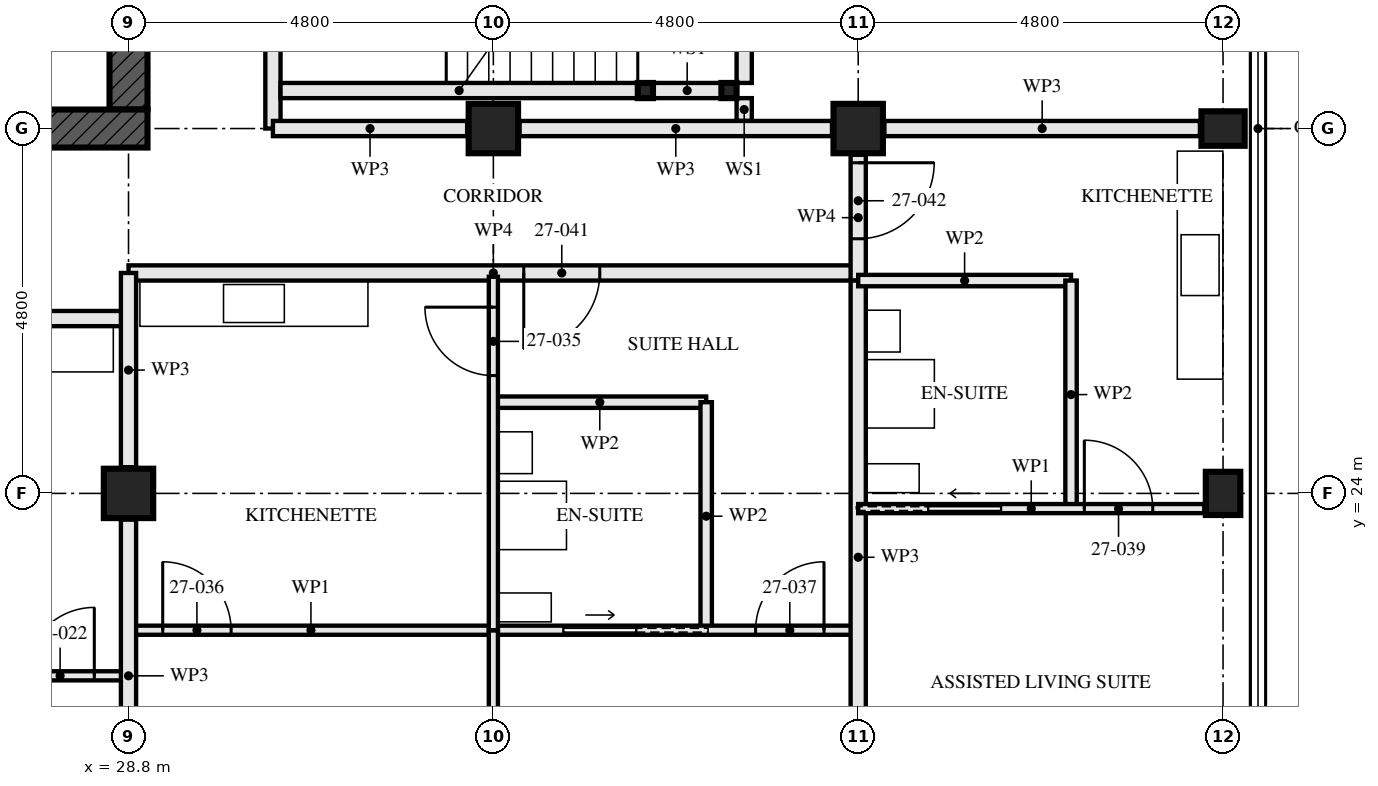
"""IFC4 building model, lengths in metres.
Left out: names, types, materials, properties, quantities, classifications, styles, units other than length and angle.
Written with IfcOpenShell. Run it as: python <this file> out.ifc"""

import sys

from ifc_helpers import new_model, si_unit, direction, frame, frame_2d, origin, origin_2d, place, context, subcontext, project, spatial, rectangle, hollow_rectangle, i_section, extrude, element, fill, save


model = new_model("IFC4")
c1 = context("Model", 3, precision=1e-05, world=origin(), true_north=direction((0.0, 1.0)))
c2 = subcontext(c1, "Body", "Model", "MODEL_VIEW")
j1 = project(units=[si_unit("LENGTHUNIT", "METRE"), si_unit("PLANEANGLEUNIT", "RADIAN")], contexts=[c1])
p1 = place(None, origin())
s1 = spatial("IfcSite", under=j1, at=p1, CompositionType="ELEMENT")
p2 = place(p1, origin())
s2 = spatial("IfcBuilding", under=s1, at=p2, CompositionType="ELEMENT")
p3 = place(p2, frame((0.0, 0.0, 101.5)))
s3 = spatial("IfcBuildingStorey", under=s2, at=p3, CompositionType="ELEMENT", Elevation=101.5)
for number, where, z_axis, x_axis in (
    (1, (28.8, 24.0, 0.0), (0.0, 0.0, 1.0), (1.0, 0.0, 0.0)),
    (2, (33.6, 28.8, 0.0), (0.0, 0.0, 1.0), (0.0, 1.0, 0.0)),
    (3, (38.4, 28.8, 0.0), (0.0, 0.0, 1.0), (0.0, 1.0, 0.0)),
):
    element("IfcColumn", number, at=place(p3, frame(where, z_axis=z_axis, x_axis=x_axis)), inside=s3, PredefinedType="COLUMN", context=c2, shape_type="SweptSolid", body=[
        extrude(hollow_rectangle(XDim=0.65, YDim=0.65, WallThickness=0.05, at=origin_2d()), origin(), (0.0, 0.0, 1.0), 3.5),
    ])
for number, where, z_axis, x_axis in (
    (4, (43.2, 24.0, 0.0), (0.0, 0.0, 1.0), (1.0, 0.0, 0.0)),
    (5, (43.2, 28.8, 0.0), (0.0, 0.0, 1.0), (0.0, 1.0, 0.0)),
):
    element("IfcColumn", number, at=place(p3, frame(where, z_axis=z_axis, x_axis=x_axis)), inside=s3, PredefinedType="COLUMN", context=c2, shape_type="SweptSolid", body=[
        extrude(i_section(OverallWidth=0.454, OverallDepth=0.569, WebThickness=0.078, FlangeThickness=0.125, FilletRadius=0.015, at=origin_2d()), origin(), (0.0, 0.0, 1.0), 3.5),
    ])
p4 = place(p3, frame((14.15, 28.8, -0.17), z_axis=(0.0, 0.0, 1.0), x_axis=(1.0, 0.0, 0.0)))
e6 = element("IfcWall", 6, at=p4, inside=s3, PredefinedType="SHEAR", context=c2, shape_type="SweptSolid", body=[
    extrude(rectangle(XDim=14.9, YDim=0.5, at=frame_2d((7.45, 0.0))), origin(), (0.0, 0.0, 1.0), 3.5),
])
p5 = place(p4, frame((6.85, 0.0, 0.17)))
e7 = element("IfcOpeningElement", 7, at=p5, cuts=e6, PredefinedType="OPENING", context=c2, shape_type="SweptSolid", body=[
    extrude(rectangle(XDim=1.2, YDim=2.1, at=frame_2d((0.6, 1.05))), frame((0.0, 0.26, 0.0), z_axis=(0.0, -1.0, 0.0), x_axis=(1.0, 0.0, 0.0)), (0.0, 0.0, 1.0), 0.521),
])
p6 = place(p3, frame((28.8, 29.05, -0.17), z_axis=(0.0, 0.0, 1.0), x_axis=(0.0, 1.0, 0.0)))
e8 = element("IfcWall", 8, at=p6, inside=s3, PredefinedType="SHEAR", context=c2, shape_type="SweptSolid", body=[
    extrude(rectangle(XDim=13.9, YDim=0.5, at=frame_2d((6.95, 0.0))), origin(), (0.0, 0.0, 1.0), 3.5),
])
p7 = place(p6, frame((6.35, 0.0, 0.17)))
e9 = element("IfcOpeningElement", 9, at=p7, cuts=e8, PredefinedType="OPENING", context=c2, shape_type="SweptSolid", body=[
    extrude(rectangle(XDim=1.2, YDim=2.1, at=frame_2d((0.6, 1.05))), frame((0.0, 0.26, 0.0), z_axis=(0.0, -1.0, 0.0), x_axis=(1.0, 0.0, 0.0)), (0.0, 0.0, 1.0), 0.521),
])
for number, where, z_axis, x_axis in (
    (10, (36.7, 29.3, 0.0), (0.0, 0.0, 1.0), (1.0, 0.0, 0.0)),
    (11, (35.6, 29.3, 0.0), (0.0, 0.0, 1.0), (1.0, 0.0, 0.0)),
):
    element("IfcColumn", number, at=place(p3, frame(where, z_axis=z_axis, x_axis=x_axis)), inside=s3, PredefinedType="COLUMN", context=c2, shape_type="SweptSolid", body=[
        extrude(hollow_rectangle(XDim=0.2, YDim=0.2, WallThickness=0.008, at=origin_2d()), origin(), (0.0, 0.0, 1.0), 3.33),
    ])
p8 = place(p3, frame((24.0, 21.6, 0.0), z_axis=(0.0, 0.0, 1.0), x_axis=(1.0, 0.0, 0.0)))
e12 = element("IfcWall", 12, at=p8, inside=s3, PredefinedType="PARTITIONING", context=c2, shape_type="SweptSolid", body=[
    extrude(rectangle(XDim=4.8, YDim=0.12, at=frame_2d((2.4, 0.0))), origin(), (0.0, 0.0, 1.0), 3.33),
])
p9 = place(p8, frame((3.45, 0.0, 0.0)))
e13 = element("IfcOpeningElement", 13, at=p9, cuts=e12, PredefinedType="OPENING", context=c2, shape_type="SweptSolid", body=[
    extrude(rectangle(XDim=0.9, YDim=2.1, at=frame_2d((0.45, 1.05))), frame((0.0, 0.071, 0.0), z_axis=(0.0, -1.0, 0.0), x_axis=(1.0, 0.0, 0.0)), (0.0, 0.0, 1.0), 0.141),
])
p10 = place(p8, frame((0.925, 0.0, 0.0)))
e14 = element("IfcOpeningElement", 14, at=p10, cuts=e12, PredefinedType="OPENING", context=c2, shape_type="SweptSolid", body=[
    extrude(rectangle(XDim=0.95, YDim=2.1, at=frame_2d((0.475, 1.05))), frame((0.0, 0.071, 0.0), z_axis=(0.0, -1.0, 0.0), x_axis=(1.0, 0.0, 0.0)), (0.0, 0.0, 1.0), 0.141),
])
p11 = place(p3, frame((17.8, 26.3, 0.0), z_axis=(0.0, 0.0, 1.0), x_axis=(1.0, 0.0, 0.0)))
e15 = element("IfcWall", 15, at=p11, inside=s3, PredefinedType="PARTITIONING", context=c2, shape_type="SweptSolid", body=[
    extrude(rectangle(XDim=11.0, YDim=0.2, at=frame_2d((5.5, 0.0))), origin(), (0.0, 0.0, 1.0), 2.55),
])
p12 = place(p11, frame((0.06, 0.0, 0.0)))
e16 = element("IfcOpeningElement", 16, at=p12, cuts=e15, PredefinedType="OPENING", context=c2, shape_type="SweptSolid", body=[
    extrude(rectangle(XDim=1.0, YDim=2.1, at=frame_2d((0.5, 1.05))), frame((0.0, 0.111, 0.0), z_axis=(0.0, -1.0, 0.0), x_axis=(1.0, 0.0, 0.0)), (0.0, 0.0, 1.0), 0.221),
])
p13 = place(p11, frame((6.6, 0.0, 0.0)))
e17 = element("IfcOpeningElement", 17, at=p13, cuts=e15, PredefinedType="OPENING", context=c2, shape_type="SweptSolid", body=[
    extrude(rectangle(XDim=1.0, YDim=2.1, at=frame_2d((0.5, 1.05))), frame((0.0, 0.111, 0.0), z_axis=(0.0, -1.0, 0.0), x_axis=(1.0, 0.0, 0.0)), (0.0, 0.0, 1.0), 0.221),
])
p14 = place(p3, frame((36.4, 22.2, 0.0), z_axis=(0.0, 0.0, 1.0), x_axis=(0.0, 1.0, 0.0)))
e18 = element("IfcWall", 18, at=p14, inside=s3, PredefinedType="PARTITIONING", context=c2, shape_type="SweptSolid", body=[
    extrude(rectangle(XDim=3.0, YDim=0.15, at=frame_2d((1.5, 0.0))), origin(), (0.0, 0.0, 1.0), 2.55),
])
p15 = place(p3, frame((33.6, 25.2, 0.0), z_axis=(0.0, 0.0, 1.0), x_axis=(1.0, 0.0, 0.0)))
e19 = element("IfcWall", 19, at=p15, inside=s3, PredefinedType="PARTITIONING", context=c2, shape_type="SweptSolid", body=[
    extrude(rectangle(XDim=2.8, YDim=0.15, at=frame_2d((1.4, 0.0))), origin(), (0.0, 0.0, 1.0), 3.33),
])
p16 = place(p3, frame((33.6, 22.2, 0.0), z_axis=(0.0, 0.0, 1.0), x_axis=(0.0, 1.0, 0.0)))
e20 = element("IfcWall", 20, at=p16, inside=s3, PredefinedType="PARTITIONING", context=c2, shape_type="SweptSolid", body=[
    extrude(rectangle(XDim=4.65, YDim=0.12, at=frame_2d((2.325, 0.0))), origin(), (0.0, 0.0, 1.0), 2.55),
])
p17 = place(p16, frame((3.35, 0.0, 0.0)))
e21 = element("IfcOpeningElement", 21, at=p17, cuts=e20, PredefinedType="OPENING", context=c2, shape_type="SweptSolid", body=[
    extrude(rectangle(XDim=0.9, YDim=2.1, at=frame_2d((0.45, 1.05))), frame((0.0, 0.071, 0.0), z_axis=(0.0, -1.0, 0.0), x_axis=(1.0, 0.0, 0.0)), (0.0, 0.0, 1.0), 0.141),
])
p18 = place(p3, frame((28.8, 22.2, 0.0), z_axis=(0.0, 0.0, 1.0), x_axis=(1.0, 0.0, 0.0)))
e22 = element("IfcWall", 22, at=p18, inside=s3, PredefinedType="PARTITIONING", context=c2, shape_type="SweptSolid", body=[
    extrude(rectangle(XDim=4.8, YDim=0.12, at=frame_2d((2.4, 0.0))), origin(), (0.0, 0.0, 1.0), 3.33),
])
p19 = place(p18, frame((0.45, 0.0, 0.0)))
e23 = element("IfcOpeningElement", 23, at=p19, cuts=e22, PredefinedType="OPENING", context=c2, shape_type="SweptSolid", body=[
    extrude(rectangle(XDim=0.9, YDim=2.1, at=frame_2d((0.45, 1.05))), frame((0.0, 0.071, 0.0), z_axis=(0.0, -1.0, 0.0), x_axis=(1.0, 0.0, 0.0)), (0.0, 0.0, 1.0), 0.141),
])
p20 = place(p3, frame((33.6, 22.2, 0.0), z_axis=(0.0, 0.0, 1.0), x_axis=(1.0, 0.0, 0.0)))
e24 = element("IfcWall", 24, at=p20, inside=s3, PredefinedType="PARTITIONING", context=c2, shape_type="SweptSolid", body=[
    extrude(rectangle(XDim=4.8, YDim=0.12, at=frame_2d((2.4, 0.0))), origin(), (0.0, 0.0, 1.0), 3.33),
])
p21 = place(p20, frame((3.45, 0.0, 0.0)))
e25 = element("IfcOpeningElement", 25, at=p21, cuts=e24, PredefinedType="OPENING", context=c2, shape_type="SweptSolid", body=[
    extrude(rectangle(XDim=0.9, YDim=2.1, at=frame_2d((0.45, 1.05))), frame((0.0, 0.071, 0.0), z_axis=(0.0, -1.0, 0.0), x_axis=(1.0, 0.0, 0.0)), (0.0, 0.0, 1.0), 0.141),
])
p22 = place(p20, frame((0.925, 0.0, 0.0)))
e26 = element("IfcOpeningElement", 26, at=p22, cuts=e24, PredefinedType="OPENING", context=c2, shape_type="SweptSolid", body=[
    extrude(rectangle(XDim=0.95, YDim=2.1, at=frame_2d((0.475, 1.05))), frame((0.0, 0.071, 0.0), z_axis=(0.0, -1.0, 0.0), x_axis=(1.0, 0.0, 0.0)), (0.0, 0.0, 1.0), 0.141),
])
p23 = place(p3, frame((33.6, 14.647, 0.0), z_axis=(0.0, 0.0, 1.0), x_axis=(0.0, 1.0, 0.0)))
e27 = element("IfcWall", 27, at=p23, inside=s3, PredefinedType="PARTITIONING", context=c2, shape_type="SweptSolid", body=[
    extrude(rectangle(XDim=7.553, YDim=0.12, at=frame_2d((3.776, 0.0))), origin(), (0.0, 0.0, 1.0), 2.55),
])
p24 = place(p3, frame((38.4, 19.52, 0.0), z_axis=(0.0, 0.0, 1.0), x_axis=(0.0, 1.0, 0.0)))
e28 = element("IfcWall", 28, at=p24, inside=s3, PredefinedType="PARTITIONING", context=c2, shape_type="SweptSolid", body=[
    extrude(rectangle(XDim=7.28, YDim=0.2, at=frame_2d((3.64, 0.0))), origin(), (0.0, 0.0, 1.0), 2.55),
])
p25 = place(p3, frame((41.2, 23.8, 0.0), z_axis=(0.0, 0.0, 1.0), x_axis=(0.0, 1.0, 0.0)))
e29 = element("IfcWall", 29, at=p25, inside=s3, PredefinedType="PARTITIONING", context=c2, shape_type="SweptSolid", body=[
    extrude(rectangle(XDim=3.0, YDim=0.15, at=frame_2d((1.5, 0.0))), origin(), (0.0, 0.0, 1.0), 2.55),
])
p26 = place(p3, frame((38.4, 26.8, 0.0), z_axis=(0.0, 0.0, 1.0), x_axis=(1.0, 0.0, 0.0)))
e30 = element("IfcWall", 30, at=p26, inside=s3, PredefinedType="PARTITIONING", context=c2, shape_type="SweptSolid", body=[
    extrude(rectangle(XDim=2.8, YDim=0.15, at=frame_2d((1.4, 0.0))), origin(), (0.0, 0.0, 1.0), 3.33),
])
p27 = place(p3, frame((38.4, 23.8, 0.0), z_axis=(0.0, 0.0, 1.0), x_axis=(1.0, 0.0, 0.0)))
e31 = element("IfcWall", 31, at=p27, inside=s3, PredefinedType="PARTITIONING", context=c2, shape_type="SweptSolid", body=[
    extrude(rectangle(XDim=4.553, YDim=0.12, at=frame_2d((2.276, 0.0))), origin(), (0.0, 0.0, 1.0), 3.33),
])
p28 = place(p27, frame((2.975, 0.0, 0.0)))
e32 = element("IfcOpeningElement", 32, at=p28, cuts=e31, PredefinedType="OPENING", context=c2, shape_type="SweptSolid", body=[
    extrude(rectangle(XDim=0.9, YDim=2.1, at=frame_2d((0.45, 1.05))), frame((0.0, 0.071, 0.0), z_axis=(0.0, -1.0, 0.0), x_axis=(1.0, 0.0, 0.0)), (0.0, 0.0, 1.0), 0.141),
])
p29 = place(p27, frame((0.925, 0.0, 0.0)))
e33 = element("IfcOpeningElement", 33, at=p29, cuts=e31, PredefinedType="OPENING", context=c2, shape_type="SweptSolid", body=[
    extrude(rectangle(XDim=0.95, YDim=2.1, at=frame_2d((0.475, 1.05))), frame((0.0, 0.071, 0.0), z_axis=(0.0, -1.0, 0.0), x_axis=(1.0, 0.0, 0.0)), (0.0, 0.0, 1.0), 0.141),
])
p30 = place(p3, frame((28.8, 26.9, 0.0), z_axis=(0.0, 0.0, 1.0), x_axis=(1.0, 0.0, 0.0)))
e34 = element("IfcWall", 34, at=p30, inside=s3, PredefinedType="PARTITIONING", context=c2, shape_type="SweptSolid", body=[
    extrude(rectangle(XDim=9.6, YDim=0.2, at=frame_2d((4.8, 0.0))), origin(), (0.0, 0.0, 1.0), 3.33),
])
p31 = place(p30, frame((5.2, 0.0, 0.0)))
e35 = element("IfcOpeningElement", 35, at=p31, cuts=e34, PredefinedType="OPENING", context=c2, shape_type="SweptSolid", body=[
    extrude(rectangle(XDim=1.0, YDim=2.1, at=frame_2d((0.5, 1.05))), frame((0.0, 0.111, 0.0), z_axis=(0.0, -1.0, 0.0), x_axis=(1.0, 0.0, 0.0)), (0.0, 0.0, 1.0), 0.221),
])
p32 = place(p3, frame((38.4, 26.8, 0.0), z_axis=(0.0, 0.0, 1.0), x_axis=(0.0, 1.0, 0.0)))
e36 = element("IfcWall", 36, at=p32, inside=s3, PredefinedType="PARTITIONING", context=c2, shape_type="SweptSolid", body=[
    extrude(rectangle(XDim=1.655, YDim=0.2, at=frame_2d((0.828, 0.0))), origin(), (0.0, 0.0, 1.0), 3.33),
])
p33 = place(p32, frame((0.55, 0.0, 0.0)))
e37 = element("IfcOpeningElement", 37, at=p33, cuts=e36, PredefinedType="OPENING", context=c2, shape_type="SweptSolid", body=[
    extrude(rectangle(XDim=1.0, YDim=2.1, at=frame_2d((0.5, 1.05))), frame((0.0, 0.111, 0.0), z_axis=(0.0, -1.0, 0.0), x_axis=(1.0, 0.0, 0.0)), (0.0, 0.0, 1.0), 0.221),
])
p34 = place(p3, frame((36.6, 29.3, 0.0), z_axis=(0.0, 0.0, 1.0), x_axis=(-1.0, 0.0, 0.0)))
e38 = element("IfcWall", 38, at=p34, inside=s3, PredefinedType="SOLIDWALL", context=c2, shape_type="SweptSolid", body=[
    extrude(rectangle(XDim=0.9, YDim=0.2, at=frame_2d((0.45, 0.0))), origin(), (0.0, 0.0, 1.0), 2.99),
])
p35 = place(p3, frame((35.5, 29.3, 0.0), z_axis=(0.0, 0.0, 1.0), x_axis=(-1.0, 0.0, 0.0)))
e39 = element("IfcWall", 39, at=p35, inside=s3, PredefinedType="SOLIDWALL", context=c2, shape_type="SweptSolid", body=[
    extrude(rectangle(XDim=4.7, YDim=0.2, at=frame_2d((2.35, 0.0))), origin(), (0.0, 0.0, 1.0), 2.99),
])
p36 = place(p3, frame((36.9, 28.9, 0.0), z_axis=(0.0, 0.0, 1.0), x_axis=(0.0, 1.0, 0.0)))
e40 = element("IfcWall", 40, at=p36, inside=s3, PredefinedType="SOLIDWALL", context=c2, shape_type="SweptSolid", body=[
    extrude(rectangle(XDim=0.3, YDim=0.2, at=frame_2d((0.15, 0.0))), origin(), (0.0, 0.0, 1.0), 3.33),
])
p37 = place(p3, frame((36.9, 29.4, 0.0), z_axis=(0.0, 0.0, 1.0), x_axis=(0.0, 1.0, 0.0)))
e41 = element("IfcWall", 41, at=p37, inside=s3, PredefinedType="SOLIDWALL", context=c2, shape_type="SweptSolid", body=[
    extrude(rectangle(XDim=2.6, YDim=0.2, at=frame_2d((1.3, 0.0))), origin(), (0.0, 0.0, 1.0), 3.33),
])
p38 = place(p3, frame((30.7, 28.8, 0.0), z_axis=(0.0, 0.0, 1.0), x_axis=(0.0, 1.0, 0.0)))
e42 = element("IfcWall", 42, at=p38, inside=s3, PredefinedType="PARTITIONING", context=c2, shape_type="SweptSolid", body=[
    extrude(rectangle(XDim=14.84, YDim=0.2, at=frame_2d((7.42, 0.0))), origin(), (0.0, 0.0, 1.0), 2.32),
])
p39 = place(p38, frame((1.4, 0.0, 0.0)))
e43 = element("IfcOpeningElement", 43, at=p39, cuts=e42, PredefinedType="OPENING", context=c2, shape_type="SweptSolid", body=[
    extrude(rectangle(XDim=1.0, YDim=2.1, at=frame_2d((0.5, 1.05))), frame((0.0, 0.111, 0.0), z_axis=(0.0, -1.0, 0.0), x_axis=(1.0, 0.0, 0.0)), (0.0, 0.0, 1.0), 0.221),
])
p40 = place(p38, frame((4.1, 0.0, 0.0)))
e44 = element("IfcOpeningElement", 44, at=p40, cuts=e42, PredefinedType="OPENING", context=c2, shape_type="SweptSolid", body=[
    extrude(rectangle(XDim=1.0, YDim=2.1, at=frame_2d((0.5, 1.05))), frame((0.0, 0.111, 0.0), z_axis=(0.0, -1.0, 0.0), x_axis=(1.0, 0.0, 0.0)), (0.0, 0.0, 1.0), 0.221),
])
p41 = place(p38, frame((5.975, 0.0, 0.0)))
e45 = element("IfcOpeningElement", 45, at=p41, cuts=e42, PredefinedType="OPENING", context=c2, shape_type="SweptSolid", body=[
    extrude(rectangle(XDim=1.0, YDim=2.1, at=frame_2d((0.5, 1.05))), frame((0.0, 0.111, 0.0), z_axis=(0.0, -1.0, 0.0), x_axis=(1.0, 0.0, 0.0)), (0.0, 0.0, 1.0), 0.221),
])
p42 = place(p38, frame((13.0, 0.0, 0.0)))
e46 = element("IfcOpeningElement", 46, at=p42, cuts=e42, PredefinedType="OPENING", context=c2, shape_type="SweptSolid", body=[
    extrude(rectangle(XDim=1.0, YDim=2.1, at=frame_2d((0.5, 1.05))), frame((0.0, 0.111, 0.0), z_axis=(0.0, -1.0, 0.0), x_axis=(1.0, 0.0, 0.0)), (0.0, 0.0, 1.0), 0.221),
])
p43 = place(p3, frame((28.8, 19.545, 0.0), z_axis=(0.0, 0.0, 1.0), x_axis=(0.0, 1.0, 0.0)))
e47 = element("IfcWall", 47, at=p43, inside=s3, PredefinedType="PARTITIONING", context=c2, shape_type="SweptSolid", body=[
    extrude(rectangle(XDim=4.11, YDim=0.2, at=frame_2d((2.055, 0.0))), origin(), (0.0, 0.0, 1.0), 2.32),
])
p44 = place(p3, frame((28.8, 24.345, 0.0), z_axis=(0.0, 0.0, 1.0), x_axis=(0.0, 1.0, 0.0)))
e48 = element("IfcWall", 48, at=p44, inside=s3, PredefinedType="PARTITIONING", context=c2, shape_type="SweptSolid", body=[
    extrude(rectangle(XDim=2.555, YDim=0.2, at=frame_2d((1.277, 0.0))), origin(), (0.0, 0.0, 1.0), 2.32),
])
p45 = place(p3, frame((42.896, 28.8, 0.0), z_axis=(0.0, 0.0, 1.0), x_axis=(-1.0, 0.0, 0.0)))
e49 = element("IfcWall", 49, at=p45, inside=s3, PredefinedType="PARTITIONING", context=c2, shape_type="SweptSolid", body=[
    extrude(rectangle(XDim=4.15, YDim=0.2, at=frame_2d((2.075, 0.0))), origin(), (0.0, 0.0, 1.0), 2.32),
])
p46 = place(p3, frame((38.055, 28.8, 0.0), z_axis=(0.0, 0.0, 1.0), x_axis=(-1.0, 0.0, 0.0)))
e50 = element("IfcWall", 50, at=p46, inside=s3, PredefinedType="PARTITIONING", context=c2, shape_type="SweptSolid", body=[
    extrude(rectangle(XDim=4.11, YDim=0.2, at=frame_2d((2.055, 0.0))), origin(), (0.0, 0.0, 1.0), 2.32),
])
p47 = place(p3, frame((33.255, 28.8, 0.0), z_axis=(0.0, 0.0, 1.0), x_axis=(-1.0, 0.0, 0.0)))
e51 = element("IfcWall", 51, at=p47, inside=s3, PredefinedType="PARTITIONING", context=c2, shape_type="SweptSolid", body=[
    extrude(rectangle(XDim=2.555, YDim=0.2, at=frame_2d((1.277, 0.0))), origin(), (0.0, 0.0, 1.0), 2.32),
])
p48 = place(p9, origin())
e52 = element("IfcDoor", 52, at=p48, inside=s3, OperationType="SINGLE_SWING_LEFT", PredefinedType="DOOR", context=c2, shape_type="SweptSolid", body=[
    extrude(rectangle(XDim=0.9, YDim=2.1, at=frame_2d((0.45, 1.05))), frame((0.0, 0.022, 0.0), z_axis=(0.0, -1.0, 0.0), x_axis=(1.0, 0.0, 0.0)), (0.0, 0.0, 1.0), 0.044),
])
fill(e13, e52)
p49 = place(p17, origin())
e53 = element("IfcDoor", 53, at=p49, inside=s3, OperationType="SINGLE_SWING_LEFT", PredefinedType="DOOR", context=c2, shape_type="SweptSolid", body=[
    extrude(rectangle(XDim=0.9, YDim=2.1, at=frame_2d((0.45, 1.05))), frame((0.0, 0.022, 0.0), z_axis=(0.0, -1.0, 0.0), x_axis=(1.0, 0.0, 0.0)), (0.0, 0.0, 1.0), 0.044),
])
fill(e21, e53)
p50 = place(p19, origin())
e54 = element("IfcDoor", 54, at=p50, inside=s3, OperationType="SINGLE_SWING_RIGHT", PredefinedType="DOOR", context=c2, shape_type="SweptSolid", body=[
    extrude(rectangle(XDim=0.9, YDim=2.1, at=frame_2d((0.45, 1.05))), frame((0.0, 0.022, 0.0), z_axis=(0.0, -1.0, 0.0), x_axis=(1.0, 0.0, 0.0)), (0.0, 0.0, 1.0), 0.044),
])
fill(e23, e54)
p51 = place(p21, origin())
e55 = element("IfcDoor", 55, at=p51, inside=s3, OperationType="SINGLE_SWING_LEFT", PredefinedType="DOOR", context=c2, shape_type="SweptSolid", body=[
    extrude(rectangle(XDim=0.9, YDim=2.1, at=frame_2d((0.45, 1.05))), frame((0.0, 0.022, 0.0), z_axis=(0.0, -1.0, 0.0), x_axis=(1.0, 0.0, 0.0)), (0.0, 0.0, 1.0), 0.044),
])
fill(e25, e55)
p52 = place(p22, origin())
e56 = element("IfcDoor", 56, at=p52, inside=s3, OperationType="SLIDING_TO_LEFT", PredefinedType="DOOR", context=c2, shape_type="SweptSolid", body=[
    extrude(rectangle(XDim=0.95, YDim=2.1, at=frame_2d((0.475, 1.05))), frame((0.0, 0.022, 0.0), z_axis=(0.0, -1.0, 0.0), x_axis=(1.0, 0.0, 0.0)), (0.0, 0.0, 1.0), 0.044),
])
fill(e26, e56)
p53 = place(p28, origin())
e57 = element("IfcDoor", 57, at=p53, inside=s3, OperationType="SINGLE_SWING_RIGHT", PredefinedType="DOOR", context=c2, shape_type="SweptSolid", body=[
    extrude(rectangle(XDim=0.9, YDim=2.1, at=frame_2d((0.45, 1.05))), frame((0.0, 0.022, 0.0), z_axis=(0.0, -1.0, 0.0), x_axis=(1.0, 0.0, 0.0)), (0.0, 0.0, 1.0), 0.044),
])
fill(e32, e57)
p54 = place(p29, origin())
e58 = element("IfcDoor", 58, at=p54, inside=s3, OperationType="SLIDING_TO_RIGHT", PredefinedType="DOOR", context=c2, shape_type="SweptSolid", body=[
    extrude(rectangle(XDim=0.95, YDim=2.1, at=frame_2d((0.475, 1.05))), frame((0.0, 0.022, 0.0), z_axis=(0.0, -1.0, 0.0), x_axis=(1.0, 0.0, 0.0)), (0.0, 0.0, 1.0), 0.044),
])
fill(e33, e58)
p55 = place(p31, frame((1.0, 0.0, 0.0), z_axis=(0.0, 0.0, 1.0), x_axis=(-1.0, 0.0, 0.0)))
e59 = element("IfcDoor", 59, at=p55, inside=s3, OperationType="SINGLE_SWING_LEFT", PredefinedType="DOOR", context=c2, shape_type="SweptSolid", body=[
    extrude(rectangle(XDim=1.0, YDim=2.1, at=frame_2d((0.5, 1.05))), frame((0.0, 0.027, 0.0), z_axis=(0.0, -1.0, 0.0), x_axis=(1.0, 0.0, 0.0)), (0.0, 0.0, 1.0), 0.054),
])
fill(e35, e59)
p56 = place(p33, frame((1.0, 0.0, 0.0), z_axis=(0.0, 0.0, 1.0), x_axis=(-1.0, 0.0, 0.0)))
e60 = element("IfcDoor", 60, at=p56, inside=s3, OperationType="SINGLE_SWING_RIGHT", PredefinedType="DOOR", context=c2, shape_type="SweptSolid", body=[
    extrude(rectangle(XDim=1.0, YDim=2.1, at=frame_2d((0.5, 1.05))), frame((0.0, 0.027, 0.0), z_axis=(0.0, -1.0, 0.0), x_axis=(1.0, 0.0, 0.0)), (0.0, 0.0, 1.0), 0.054),
])
fill(e37, e60)
save(model, sys.argv[1])
